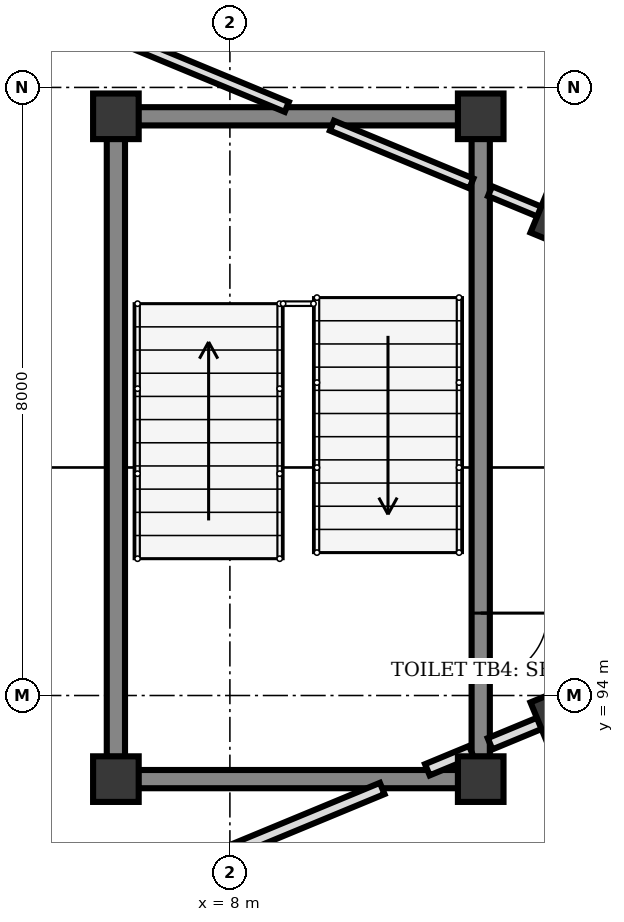
"""IFC4 building model, lengths in metres.
Left out: names, types, materials, properties, quantities, classifications, styles, units other than length and angle.
Written with IfcOpenShell. Run it as: python <this file> out.ifc"""

import sys

from ifc_helpers import new_model, si_unit, direction, frame, frame_2d, origin, origin_2d, place, context, subcontext, project, spatial, rectangle, extrude, element, fill, save


model = new_model("IFC4")
c1 = context("Model", 3, precision=1e-05, world=origin(), true_north=direction((0.0, 1.0)))
c2 = subcontext(c1, "Body", "Model", "MODEL_VIEW")
j1 = project(units=[si_unit("LENGTHUNIT", "METRE"), si_unit("PLANEANGLEUNIT", "RADIAN")], contexts=[c1])
p1 = place(None, origin())
s1 = spatial("IfcSite", under=j1, at=p1, CompositionType="ELEMENT")
p2 = place(p1, origin())
s2 = spatial("IfcBuilding", under=s1, at=p2, CompositionType="ELEMENT")
p3 = place(p2, origin())
s3 = spatial("IfcBuildingStorey", under=s2, at=p3, CompositionType="ELEMENT", Elevation=0.0)
for number, where, z_axis, x_axis in (
    (1, (6.5, 92.9, 0.0), (0.0, 0.0, 1.0), (1.0, 0.0, 0.0)),
    (2, (11.3, 92.9, 0.0), (0.0, 0.0, 1.0), (1.0, 0.0, 0.0)),
    (3, (11.3, 101.62, 0.0), (0.0, 0.0, 1.0), (1.0, 0.0, 0.0)),
    (4, (6.5, 101.62, 0.0), (0.0, 0.0, 1.0), (1.0, 0.0, 0.0)),
    (5, (12.347, 100.253, 0.0), (0.0, 0.0, 1.0), (-0.924, 0.383, 0.0)),
    (6, (12.347, 93.747, 0.0), (0.0, 0.0, 1.0), (-0.924, -0.383, 0.0)),
):
    element("IfcColumn", number, at=place(p3, frame(where, z_axis=z_axis, x_axis=x_axis)), inside=s3, PredefinedType="COLUMN", context=c2, shape_type="SweptSolid", body=[
        extrude(rectangle(XDim=0.6, YDim=0.6, at=origin_2d()), origin(), (0.0, 0.0, 1.0), 4.5),
    ])
p4 = place(p3, frame((6.5, 93.192, 0.0), z_axis=(0.0, 0.0, 1.0), x_axis=(0.0, 1.0, 0.0)))
e7 = element("IfcWall", 7, at=p4, inside=s3, PredefinedType="SHEAR", context=c2, shape_type="SweptSolid", body=[
    extrude(rectangle(XDim=8.136, YDim=0.24, at=frame_2d((4.068, 0.0))), origin(), (0.0, 0.0, 1.0), 4.24),
])
p5 = place(p3, frame((11.3, 101.328, 0.0), z_axis=(0.0, 0.0, 1.0), x_axis=(0.0, -1.0, 0.0)))
e8 = element("IfcWall", 8, at=p5, inside=s3, PredefinedType="SHEAR", context=c2, shape_type="SweptSolid", body=[
    extrude(rectangle(XDim=8.136, YDim=0.24, at=frame_2d((4.068, 0.0))), origin(), (0.0, 0.0, 1.0), 4.24),
])
p6 = place(p5, frame((6.244, 0.0, 0.0)))
e9 = element("IfcOpeningElement", 9, at=p6, cuts=e8, PredefinedType="OPENING", context=c2, shape_type="SweptSolid", body=[
    extrude(rectangle(XDim=0.88, YDim=2.1, at=frame_2d((0.44, 1.05))), frame((0.0, 0.13, 0.0), z_axis=(0.0, -1.0, 0.0), x_axis=(1.0, 0.0, 0.0)), (0.0, 0.0, 1.0), 0.26),
])
for number, where, z_axis, x_axis in (
    (10, (11.008, 92.9, 0.0), (0.0, 0.0, 1.0), (-1.0, 0.0, 0.0)),
    (11, (11.008, 101.62, 0.0), (0.0, 0.0, 1.0), (-1.0, 0.0, 0.0)),
):
    element("IfcWall", number, at=place(p3, frame(where, z_axis=z_axis, x_axis=x_axis)), inside=s3, PredefinedType="SHEAR", context=c2, shape_type="SweptSolid", body=[
        extrude(rectangle(XDim=4.216, YDim=0.24, at=frame_2d((2.108, 0.0))), origin(), (0.0, 0.0, 1.0), 4.24),
    ])
p7 = place(p3, frame((12.077, 100.364, 0.0), z_axis=(0.0, 0.0, 1.0), x_axis=(-0.923789734747, 0.382900151445, 0.0)))
e12 = element("IfcWall", 12, at=p7, inside=s3, PredefinedType="PARTITIONING", context=c2, shape_type="SweptSolid", body=[
    extrude(rectangle(XDim=0.708, YDim=0.14, at=frame_2d((0.354, 0.0))), origin(), (0.0, 0.0, 1.0), 4.2),
])
p8 = place(p3, frame((11.177, 100.737, 0.0), z_axis=(0.0, 0.0, 1.0), x_axis=(-0.923817443679, 0.382833293686, 0.0)))
e13 = element("IfcWall", 13, at=p8, inside=s3, PredefinedType="PARTITIONING", context=c2, shape_type="SweptSolid", body=[
    extrude(rectangle(XDim=1.985, YDim=0.14, at=frame_2d((0.993, 0.0))), origin(), (0.0, 0.0, 1.0), 4.2),
])
p9 = place(p3, frame((8.749, 101.743, 0.0), z_axis=(0.0, 0.0, 1.0), x_axis=(-0.923842829076, 0.38277203028, 0.0)))
e14 = element("IfcWall", 14, at=p9, inside=s3, PredefinedType="PARTITIONING", context=c2, shape_type="SweptSolid", body=[
    extrude(rectangle(XDim=4.789, YDim=0.14, at=frame_2d((2.395, 0.0))), origin(), (0.0, 0.0, 1.0), 4.2),
])
p10 = place(p3, frame((12.077, 93.636, 0.0), z_axis=(0.0, 0.0, 1.0), x_axis=(-0.923789734747, -0.382900151445, 0.0)))
e15 = element("IfcWall", 15, at=p10, inside=s3, PredefinedType="PARTITIONING", context=c2, shape_type="SweptSolid", body=[
    extrude(rectangle(XDim=0.708, YDim=0.16, at=frame_2d((0.354, 0.0))), origin(), (0.0, 0.0, 1.0), 3.552),
])
p11 = place(p3, frame((11.177, 93.263, 0.0), z_axis=(0.0, 0.0, 1.0), x_axis=(-0.923812676193, -0.382844797933, 0.0)))
e16 = element("IfcWall", 16, at=p11, inside=s3, PredefinedType="PARTITIONING", context=c2, shape_type="SweptSolid", body=[
    extrude(rectangle(XDim=0.627, YDim=0.16, at=frame_2d((0.313, 0.0))), origin(), (0.0, 0.0, 1.0), 3.552),
])
p12 = place(p3, frame((10.004, 92.777, 0.0), z_axis=(0.0, 0.0, 1.0), x_axis=(-0.923837705987, -0.382784394923, 0.0)))
e17 = element("IfcWall", 17, at=p12, inside=s3, PredefinedType="PARTITIONING", context=c2, shape_type="SweptSolid", body=[
    extrude(rectangle(XDim=6.147, YDim=0.16, at=frame_2d((3.074, 0.0))), origin(), (0.0, 0.0, 1.0), 3.552),
])
p13 = place(p6, origin())
e18 = element("IfcDoor", 18, at=p13, inside=s3, OperationType="SINGLE_SWING_LEFT", PredefinedType="DOOR", context=c2, shape_type="SweptSolid", body=[
    extrude(rectangle(XDim=0.88, YDim=2.1, at=frame_2d((0.44, 1.05))), frame((0.0, 0.025, 0.0), z_axis=(0.0, -1.0, 0.0), x_axis=(1.0, 0.0, 0.0)), (0.0, 0.0, 1.0), 0.05),
])
fill(e9, e18)
save(model, sys.argv[1])
